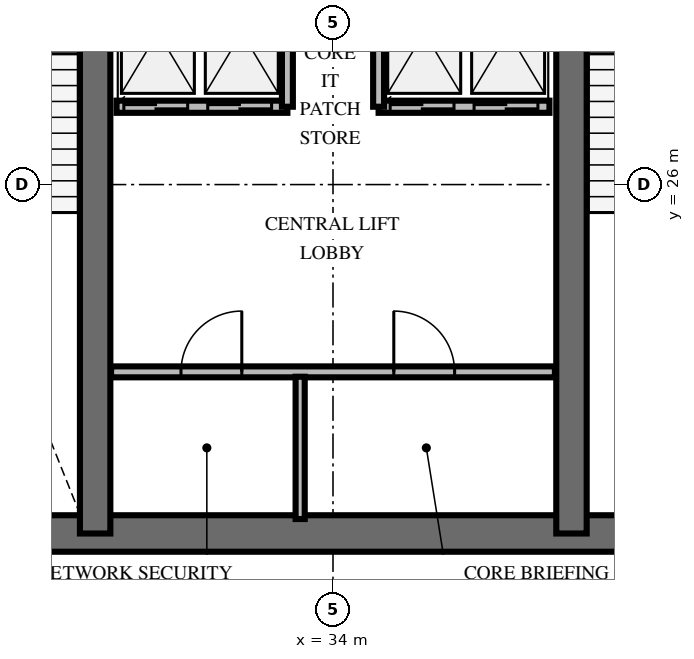
"""IFC4 building model, lengths in metres.
Left out: names, types, materials, properties, quantities, classifications, styles, units other than length and angle.
Written with IfcOpenShell. Run it as: python <this file> out.ifc"""

import sys

from ifc_helpers import new_model, si_unit, direction, frame, frame_2d, origin, place, context, subcontext, project, spatial, rectangle, extrude, element, fill, save


model = new_model("IFC4")
c1 = context("Model", 3, precision=1e-05, world=origin(), true_north=direction((0.0, 1.0)))
c2 = subcontext(c1, "Body", "Model", "MODEL_VIEW")
j1 = project(units=[si_unit("LENGTHUNIT", "METRE"), si_unit("PLANEANGLEUNIT", "RADIAN")], contexts=[c1])
p1 = place(None, origin())
s1 = spatial("IfcSite", under=j1, at=p1, CompositionType="ELEMENT")
p2 = place(p1, origin())
s2 = spatial("IfcBuilding", under=s1, at=p2, CompositionType="ELEMENT")
p3 = place(p2, frame((0.0, 0.0, 270.0)))
s3 = spatial("IfcBuildingStorey", under=s2, at=p3, CompositionType="ELEMENT", Elevation=270.0)
p4 = place(p3, frame((26.222, 20.262, 0.0), z_axis=(0.0, 0.0, 1.0), x_axis=(1.0, 0.0, 0.0)))
e1 = element("IfcWall", 1, at=p4, inside=s3, PredefinedType="SHEAR", context=c2, shape_type="SweptSolid", body=[
    extrude(rectangle(XDim=15.566, YDim=0.6, at=frame_2d((7.783, 0.0))), origin(), (0.0, 0.0, 1.0), 3.6),
])
for number, where, z_axis, x_axis in (
    (2, (30.088, 20.262, 0.0), (0.0, 0.0, 1.0), (0.0, 1.0, 0.0)),
    (3, (37.922, 20.262, 0.0), (0.0, 0.0, 1.0), (0.0, 1.0, 0.0)),
):
    element("IfcWall", number, at=place(p3, frame(where, z_axis=z_axis, x_axis=x_axis)), inside=s3, PredefinedType="SHEAR", context=c2, shape_type="SweptSolid", body=[
        extrude(rectangle(XDim=9.676, YDim=0.5, at=frame_2d((4.838, 0.0))), origin(), (0.0, 0.0, 1.0), 3.6),
    ])
p5 = place(p3, frame((30.35, 22.92, 0.0), z_axis=(0.0, 0.0, 1.0), x_axis=(1.0, 0.0, 0.0)))
e4 = element("IfcWall", 4, at=p5, inside=s3, PredefinedType="PARTITIONING", context=c2, shape_type="SweptSolid", body=[
    extrude(rectangle(XDim=7.3, YDim=0.18, at=frame_2d((3.65, 0.0))), origin(), (0.0, 0.0, 1.0), 2.46),
])
p6 = place(p5, frame((1.15, 0.0, 0.0)))
e5 = element("IfcOpeningElement", 5, at=p6, cuts=e4, PredefinedType="OPENING", context=c2, shape_type="SweptSolid", body=[
    extrude(rectangle(XDim=1.0, YDim=2.15, at=frame_2d((0.5, 1.075))), frame((0.0, 0.1, 0.0), z_axis=(0.0, -1.0, 0.0), x_axis=(1.0, 0.0, 0.0)), (0.0, 0.0, 1.0), 0.2),
])
p7 = place(p5, frame((4.65, 0.0, 0.0)))
e6 = element("IfcOpeningElement", 6, at=p7, cuts=e4, PredefinedType="OPENING", context=c2, shape_type="SweptSolid", body=[
    extrude(rectangle(XDim=1.0, YDim=2.15, at=frame_2d((0.5, 1.075))), frame((0.0, 0.1, 0.0), z_axis=(0.0, -1.0, 0.0), x_axis=(1.0, 0.0, 0.0)), (0.0, 0.0, 1.0), 0.2),
])
p8 = place(p3, frame((33.46, 20.5, 0.0), z_axis=(0.0, 0.0, 1.0), x_axis=(0.0, 1.0, 0.0)))
e7 = element("IfcWall", 7, at=p8, inside=s3, PredefinedType="PARTITIONING", context=c2, shape_type="SweptSolid", body=[
    extrude(rectangle(XDim=2.34, YDim=0.15, at=frame_2d((1.17, 0.0))), origin(), (0.0, 0.0, 1.0), 2.46),
])
p9 = place(p3, frame((30.44, 27.28, 0.0), z_axis=(0.0, 0.0, 1.0), x_axis=(1.0, 0.0, 0.0)))
e8 = element("IfcWall", 8, at=p9, inside=s3, PredefinedType="SOLIDWALL", context=c2, shape_type="SweptSolid", body=[
    extrude(rectangle(XDim=2.81, YDim=0.2, at=frame_2d((1.405, 0.0))), origin(), (0.0, 0.0, 1.0), 2.46),
])
p10 = place(p9, frame((0.12, 0.0, 0.0)))
e9 = element("IfcOpeningElement", 9, at=p10, cuts=e8, PredefinedType="OPENING", context=c2, shape_type="SweptSolid", body=[
    extrude(rectangle(XDim=1.05, YDim=2.1, at=frame_2d((0.525, 1.05))), frame((0.0, 0.11, 0.0), z_axis=(0.0, -1.0, 0.0), x_axis=(1.0, 0.0, 0.0)), (0.0, 0.0, 1.0), 0.22),
])
p11 = place(p9, frame((1.5, 0.0, 0.0)))
e10 = element("IfcOpeningElement", 10, at=p11, cuts=e8, PredefinedType="OPENING", context=c2, shape_type="SweptSolid", body=[
    extrude(rectangle(XDim=1.05, YDim=2.1, at=frame_2d((0.525, 1.05))), frame((0.0, 0.11, 0.0), z_axis=(0.0, -1.0, 0.0), x_axis=(1.0, 0.0, 0.0)), (0.0, 0.0, 1.0), 0.22),
])
p12 = place(p3, frame((33.25, 27.28, 0.0), z_axis=(0.0, 0.0, 1.0), x_axis=(0.0, 1.0, 0.0)))
e11 = element("IfcWall", 11, at=p12, inside=s3, PredefinedType="SOLIDWALL", context=c2, shape_type="SweptSolid", body=[
    extrude(rectangle(XDim=2.47, YDim=0.18, at=frame_2d((1.235, 0.0))), origin(), (0.0, 0.0, 1.0), 2.46),
])
p13 = place(p3, frame((34.75, 27.28, 0.0), z_axis=(0.0, 0.0, 1.0), x_axis=(1.0, 0.0, 0.0)))
e12 = element("IfcWall", 12, at=p13, inside=s3, PredefinedType="SOLIDWALL", context=c2, shape_type="SweptSolid", body=[
    extrude(rectangle(XDim=2.81, YDim=0.2, at=frame_2d((1.405, 0.0))), origin(), (0.0, 0.0, 1.0), 2.46),
])
p14 = place(p13, frame((0.19, 0.0, 0.0)))
e13 = element("IfcOpeningElement", 13, at=p14, cuts=e12, PredefinedType="OPENING", context=c2, shape_type="SweptSolid", body=[
    extrude(rectangle(XDim=1.05, YDim=2.1, at=frame_2d((0.525, 1.05))), frame((0.0, 0.11, 0.0), z_axis=(0.0, -1.0, 0.0), x_axis=(1.0, 0.0, 0.0)), (0.0, 0.0, 1.0), 0.22),
])
p15 = place(p13, frame((1.57, 0.0, 0.0)))
e14 = element("IfcOpeningElement", 14, at=p15, cuts=e12, PredefinedType="OPENING", context=c2, shape_type="SweptSolid", body=[
    extrude(rectangle(XDim=1.05, YDim=2.1, at=frame_2d((0.525, 1.05))), frame((0.0, 0.11, 0.0), z_axis=(0.0, -1.0, 0.0), x_axis=(1.0, 0.0, 0.0)), (0.0, 0.0, 1.0), 0.22),
])
p16 = place(p3, frame((34.75, 27.28, 0.0), z_axis=(0.0, 0.0, 1.0), x_axis=(0.0, 1.0, 0.0)))
e15 = element("IfcWall", 15, at=p16, inside=s3, PredefinedType="SOLIDWALL", context=c2, shape_type="SweptSolid", body=[
    extrude(rectangle(XDim=2.47, YDim=0.18, at=frame_2d((1.235, 0.0))), origin(), (0.0, 0.0, 1.0), 2.46),
])
p17 = place(p6, origin())
e16 = element("IfcDoor", 16, at=p17, inside=s3, OperationType="SINGLE_SWING_RIGHT", PredefinedType="DOOR", context=c2, shape_type="SweptSolid", body=[
    extrude(rectangle(XDim=1.0, YDim=2.15, at=frame_2d((0.5, 1.075))), frame((0.0, 0.025, 0.0), z_axis=(0.0, -1.0, 0.0), x_axis=(1.0, 0.0, 0.0)), (0.0, 0.0, 1.0), 0.05),
])
fill(e5, e16)
p18 = place(p7, origin())
e17 = element("IfcDoor", 17, at=p18, inside=s3, OperationType="SINGLE_SWING_LEFT", PredefinedType="DOOR", context=c2, shape_type="SweptSolid", body=[
    extrude(rectangle(XDim=1.0, YDim=2.15, at=frame_2d((0.5, 1.075))), frame((0.0, 0.025, 0.0), z_axis=(0.0, -1.0, 0.0), x_axis=(1.0, 0.0, 0.0)), (0.0, 0.0, 1.0), 0.05),
])
fill(e6, e17)
p19 = place(p10, origin())
e18 = element("IfcDoor", 18, at=p19, inside=s3, OperationType="DOUBLE_DOOR_SLIDING", PredefinedType="USERDEFINED", context=c2, shape_type="SweptSolid", body=[
    extrude(rectangle(XDim=1.05, YDim=2.1, at=frame_2d((0.525, 1.05))), frame((0.0, 0.025, 0.0), z_axis=(0.0, -1.0, 0.0), x_axis=(1.0, 0.0, 0.0)), (0.0, 0.0, 1.0), 0.05),
])
fill(e9, e18)
p20 = place(p11, origin())
e19 = element("IfcDoor", 19, at=p20, inside=s3, OperationType="DOUBLE_DOOR_SLIDING", PredefinedType="USERDEFINED", context=c2, shape_type="SweptSolid", body=[
    extrude(rectangle(XDim=1.05, YDim=2.1, at=frame_2d((0.525, 1.05))), frame((0.0, 0.025, 0.0), z_axis=(0.0, -1.0, 0.0), x_axis=(1.0, 0.0, 0.0)), (0.0, 0.0, 1.0), 0.05),
])
fill(e10, e19)
p21 = place(p14, origin())
e20 = element("IfcDoor", 20, at=p21, inside=s3, OperationType="DOUBLE_DOOR_SLIDING", PredefinedType="USERDEFINED", context=c2, shape_type="SweptSolid", body=[
    extrude(rectangle(XDim=1.05, YDim=2.1, at=frame_2d((0.525, 1.05))), frame((0.0, 0.025, 0.0), z_axis=(0.0, -1.0, 0.0), x_axis=(1.0, 0.0, 0.0)), (0.0, 0.0, 1.0), 0.05),
])
fill(e13, e20)
p22 = place(p15, origin())
e21 = element("IfcDoor", 21, at=p22, inside=s3, OperationType="DOUBLE_DOOR_SLIDING", PredefinedType="USERDEFINED", context=c2, shape_type="SweptSolid", body=[
    extrude(rectangle(XDim=1.05, YDim=2.1, at=frame_2d((0.525, 1.05))), frame((0.0, 0.025, 0.0), z_axis=(0.0, -1.0, 0.0), x_axis=(1.0, 0.0, 0.0)), (0.0, 0.0, 1.0), 0.05),
])
fill(e14, e21)
save(model, sys.argv[1])
